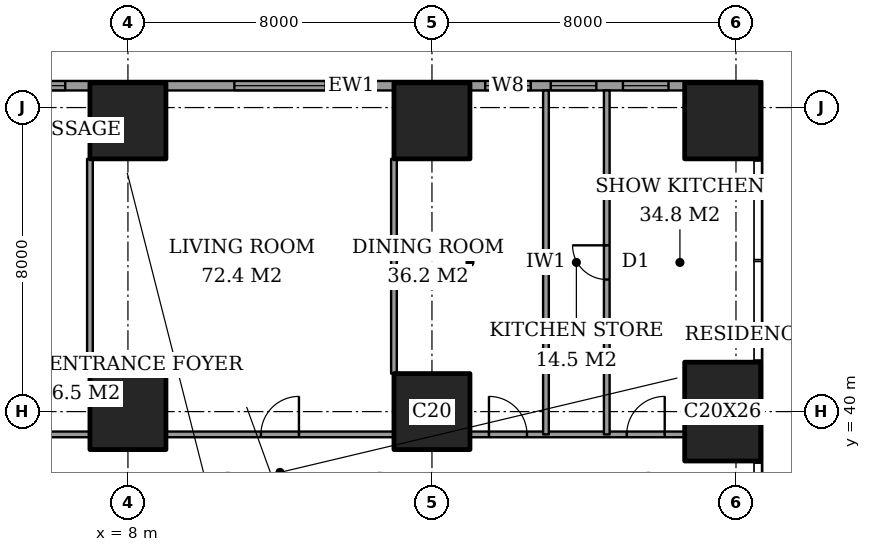
"""IFC4 building model, lengths in metres.
Left out: names, types, materials, properties, quantities, classifications, styles, units other than length and angle.
Written with IfcOpenShell. Run it as: python <this file> out.ifc"""

import sys

from ifc_helpers import new_model, si_unit, direction, frame, frame_2d, origin, origin_2d, place, context, subcontext, project, spatial, rectangle, extrude, element, fill, save


model = new_model("IFC4")
c1 = context("Model", 3, precision=1e-05, world=origin(), true_north=direction((0.0, 1.0)))
c2 = subcontext(c1, "Body", "Model", "MODEL_VIEW")
j1 = project(units=[si_unit("LENGTHUNIT", "METRE"), si_unit("PLANEANGLEUNIT", "RADIAN")], contexts=[c1])
p1 = place(None, origin())
s1 = spatial("IfcSite", under=j1, at=p1, CompositionType="ELEMENT")
p2 = place(p1, origin())
s2 = spatial("IfcBuilding", under=s1, at=p2, CompositionType="ELEMENT")
p3 = place(p2, frame((0.0, 0.0, 83.6)))
s3 = spatial("IfcBuildingStorey", under=s2, at=p3, CompositionType="ELEMENT", Elevation=83.6)
for number, where, z_axis, x_axis in (
    (1, (8.0, 40.0, 0.0), (0.0, 0.0, 1.0), (1.0, 0.0, 0.0)),
    (2, (8.0, 47.65, 0.0), (0.0, 0.0, 1.0), (1.0, 0.0, 0.0)),
    (3, (16.0, 40.0, 0.0), (0.0, 0.0, 1.0), (1.0, 0.0, 0.0)),
    (4, (16.0, 47.65, 0.0), (0.0, 0.0, 1.0), (1.0, 0.0, 0.0)),
):
    element("IfcColumn", number, at=place(p3, frame(where, z_axis=z_axis, x_axis=x_axis)), inside=s3, PredefinedType="COLUMN", context=c2, shape_type="SweptSolid", body=[
        extrude(rectangle(XDim=2.0, YDim=2.0, at=origin_2d()), origin(), (0.0, 0.0, 1.0), 3.6),
    ])
p4 = place(p3, frame((23.65, 40.0, 0.0), z_axis=(0.0, 0.0, 1.0), x_axis=(1.0, 0.0, 0.0)))
e5 = element("IfcColumn", 5, at=p4, inside=s3, PredefinedType="COLUMN", context=c2, shape_type="SweptSolid", body=[
    extrude(rectangle(XDim=2.0, YDim=2.6, at=origin_2d()), origin(), (0.0, 0.0, 1.0), 3.6),
])
p5 = place(p3, frame((23.65, 47.65, 0.0), z_axis=(0.0, 0.0, 1.0), x_axis=(1.0, 0.0, 0.0)))
e6 = element("IfcColumn", 6, at=p5, inside=s3, PredefinedType="COLUMN", context=c2, shape_type="SweptSolid", body=[
    extrude(rectangle(XDim=2.0, YDim=2.0, at=origin_2d()), origin(), (0.0, 0.0, 1.0), 3.6),
])
p6 = place(p3, frame((24.575, 48.575, 0.0), z_axis=(0.0, 0.0, 1.0), x_axis=(-1.0, 0.0, 0.0)))
e7 = element("IfcWall", 7, at=p6, inside=s3, PredefinedType="SOLIDWALL", context=c2, shape_type="SweptSolid", body=[
    extrude(rectangle(XDim=21.4, YDim=0.25, at=frame_2d((10.7, 0.0))), origin(), (0.0, 0.0, 1.0), 3.6),
])
p7 = place(p6, frame((2.35, 0.0, 0.6)))
e8 = element("IfcOpeningElement", 8, at=p7, cuts=e7, PredefinedType="OPENING", context=c2, shape_type="SweptSolid", body=[
    extrude(rectangle(XDim=1.2, YDim=2.0, at=frame_2d((0.6, 1.0))), frame((0.0, 0.135, 0.0), z_axis=(0.0, -1.0, 0.0), x_axis=(1.0, 0.0, 0.0)), (0.0, 0.0, 1.0), 0.27),
])
p8 = place(p6, frame((4.25, 0.0, 0.6)))
e9 = element("IfcOpeningElement", 9, at=p8, cuts=e7, PredefinedType="OPENING", context=c2, shape_type="SweptSolid", body=[
    extrude(rectangle(XDim=1.2, YDim=2.0, at=frame_2d((0.6, 1.0))), frame((0.0, 0.135, 0.0), z_axis=(0.0, -1.0, 0.0), x_axis=(1.0, 0.0, 0.0)), (0.0, 0.0, 1.0), 0.27),
])
p9 = place(p6, frame((5.975, 0.0, 0.6)))
e10 = element("IfcOpeningElement", 10, at=p9, cuts=e7, PredefinedType="OPENING", context=c2, shape_type="SweptSolid", body=[
    extrude(rectangle(XDim=1.2, YDim=2.0, at=frame_2d((0.6, 1.0))), frame((0.0, 0.135, 0.0), z_axis=(0.0, -1.0, 0.0), x_axis=(1.0, 0.0, 0.0)), (0.0, 0.0, 1.0), 0.27),
])
p10 = place(p6, frame((11.375, 0.0, 0.6)))
e11 = element("IfcOpeningElement", 11, at=p10, cuts=e7, PredefinedType="OPENING", context=c2, shape_type="SweptSolid", body=[
    extrude(rectangle(XDim=2.4, YDim=2.0, at=frame_2d((1.2, 1.0))), frame((0.0, 0.135, 0.0), z_axis=(0.0, -1.0, 0.0), x_axis=(1.0, 0.0, 0.0)), (0.0, 0.0, 1.0), 0.27),
])
p11 = place(p6, frame((18.225, 0.0, 0.6)))
e12 = element("IfcOpeningElement", 12, at=p11, cuts=e7, PredefinedType="OPENING", context=c2, shape_type="SweptSolid", body=[
    extrude(rectangle(XDim=2.4, YDim=2.0, at=frame_2d((1.2, 1.0))), frame((0.0, 0.135, 0.0), z_axis=(0.0, -1.0, 0.0), x_axis=(1.0, 0.0, 0.0)), (0.0, 0.0, 1.0), 0.27),
])
p12 = place(p3, frame((1.35, 39.4, 0.0), z_axis=(0.0, 0.0, 1.0), x_axis=(1.0, 0.0, 0.0)))
e13 = element("IfcWall", 13, at=p12, inside=s3, PredefinedType="PARTITIONING", context=c2, shape_type="SweptSolid", body=[
    extrude(rectangle(XDim=5.65, YDim=0.15, at=frame_2d((2.825, 0.0))), origin(), (0.0, 0.0, 1.0), 3.35),
])
p13 = place(p12, frame((2.325, 0.0, 0.0)))
e14 = element("IfcOpeningElement", 14, at=p13, cuts=e13, PredefinedType="OPENING", context=c2, shape_type="SweptSolid", body=[
    extrude(rectangle(XDim=1.0, YDim=2.1, at=frame_2d((0.5, 1.05))), frame((0.0, 0.085, 0.0), z_axis=(0.0, -1.0, 0.0), x_axis=(1.0, 0.0, 0.0)), (0.0, 0.0, 1.0), 0.17),
])
p14 = place(p3, frame((9.0, 39.4, 0.0), z_axis=(0.0, 0.0, 1.0), x_axis=(1.0, 0.0, 0.0)))
e15 = element("IfcWall", 15, at=p14, inside=s3, PredefinedType="PARTITIONING", context=c2, shape_type="SweptSolid", body=[
    extrude(rectangle(XDim=6.0, YDim=0.15, at=frame_2d((3.0, 0.0))), origin(), (0.0, 0.0, 1.0), 3.35),
])
p15 = place(p14, frame((2.5, 0.0, 0.0)))
e16 = element("IfcOpeningElement", 16, at=p15, cuts=e15, PredefinedType="OPENING", context=c2, shape_type="SweptSolid", body=[
    extrude(rectangle(XDim=1.0, YDim=2.1, at=frame_2d((0.5, 1.05))), frame((0.0, 0.085, 0.0), z_axis=(0.0, -1.0, 0.0), x_axis=(1.0, 0.0, 0.0)), (0.0, 0.0, 1.0), 0.17),
])
p16 = place(p3, frame((17.0, 39.4, 0.0), z_axis=(0.0, 0.0, 1.0), x_axis=(1.0, 0.0, 0.0)))
e17 = element("IfcWall", 17, at=p16, inside=s3, PredefinedType="PARTITIONING", context=c2, shape_type="SweptSolid", body=[
    extrude(rectangle(XDim=5.65, YDim=0.15, at=frame_2d((2.825, 0.0))), origin(), (0.0, 0.0, 1.0), 3.35),
])
p17 = place(p16, frame((0.5, 0.0, 0.0)))
e18 = element("IfcOpeningElement", 18, at=p17, cuts=e17, PredefinedType="OPENING", context=c2, shape_type="SweptSolid", body=[
    extrude(rectangle(XDim=1.0, YDim=2.1, at=frame_2d((0.5, 1.05))), frame((0.0, 0.085, 0.0), z_axis=(0.0, -1.0, 0.0), x_axis=(1.0, 0.0, 0.0)), (0.0, 0.0, 1.0), 0.17),
])
p18 = place(p16, frame((4.125, 0.0, 0.0)))
e19 = element("IfcOpeningElement", 19, at=p18, cuts=e17, PredefinedType="OPENING", context=c2, shape_type="SweptSolid", body=[
    extrude(rectangle(XDim=1.0, YDim=2.1, at=frame_2d((0.5, 1.05))), frame((0.0, 0.085, 0.0), z_axis=(0.0, -1.0, 0.0), x_axis=(1.0, 0.0, 0.0)), (0.0, 0.0, 1.0), 0.17),
])
for number, where, z_axis, x_axis in (
    (20, (7.0, 41.0, 0.0), (0.0, 0.0, 1.0), (0.0, 1.0, 0.0)),
    (21, (15.0, 41.0, 0.0), (0.0, 0.0, 1.0), (0.0, 1.0, 0.0)),
):
    element("IfcWall", number, at=place(p3, frame(where, z_axis=z_axis, x_axis=x_axis)), inside=s3, PredefinedType="PARTITIONING", context=c2, shape_type="SweptSolid", body=[
        extrude(rectangle(XDim=5.65, YDim=0.15, at=frame_2d((2.825, 0.0))), origin(), (0.0, 0.0, 1.0), 3.35),
    ])
p19 = place(p3, frame((19.0, 39.4, 0.0), z_axis=(0.0, 0.0, 1.0), x_axis=(0.0, 1.0, 0.0)))
e22 = element("IfcWall", 22, at=p19, inside=s3, PredefinedType="PARTITIONING", context=c2, shape_type="SweptSolid", body=[
    extrude(rectangle(XDim=9.05, YDim=0.15, at=frame_2d((4.525, 0.0))), origin(), (0.0, 0.0, 1.0), 3.35),
])
p20 = place(p3, frame((20.6, 39.4, 0.0), z_axis=(0.0, 0.0, 1.0), x_axis=(0.0, 1.0, 0.0)))
e23 = element("IfcWall", 23, at=p20, inside=s3, PredefinedType="PARTITIONING", context=c2, shape_type="SweptSolid", body=[
    extrude(rectangle(XDim=9.05, YDim=0.15, at=frame_2d((4.525, 0.0))), origin(), (0.0, 0.0, 1.0), 3.35),
])
p21 = place(p20, frame((4.075, 0.0, 0.0)))
e24 = element("IfcOpeningElement", 24, at=p21, cuts=e23, PredefinedType="OPENING", context=c2, shape_type="SweptSolid", body=[
    extrude(rectangle(XDim=0.9, YDim=2.1, at=frame_2d((0.45, 1.05))), frame((0.0, 0.085, 0.0), z_axis=(0.0, -1.0, 0.0), x_axis=(1.0, 0.0, 0.0)), (0.0, 0.0, 1.0), 0.17),
])
p22 = place(p7, origin())
e25 = element("IfcWindow", 25, at=p22, inside=s3, PartitioningType="SINGLE_PANEL", PredefinedType="WINDOW", context=c2, shape_type="SweptSolid", body=[
    extrude(rectangle(XDim=1.2, YDim=2.0, at=frame_2d((0.6, 1.0))), frame((0.0, 0.03, 0.0), z_axis=(0.0, -1.0, 0.0), x_axis=(1.0, 0.0, 0.0)), (0.0, 0.0, 1.0), 0.06),
])
fill(e8, e25)
p23 = place(p8, origin())
e26 = element("IfcWindow", 26, at=p23, inside=s3, PartitioningType="SINGLE_PANEL", PredefinedType="WINDOW", context=c2, shape_type="SweptSolid", body=[
    extrude(rectangle(XDim=1.2, YDim=2.0, at=frame_2d((0.6, 1.0))), frame((0.0, 0.03, 0.0), z_axis=(0.0, -1.0, 0.0), x_axis=(1.0, 0.0, 0.0)), (0.0, 0.0, 1.0), 0.06),
])
fill(e9, e26)
p24 = place(p9, origin())
e27 = element("IfcWindow", 27, at=p24, inside=s3, PartitioningType="SINGLE_PANEL", PredefinedType="WINDOW", context=c2, shape_type="SweptSolid", body=[
    extrude(rectangle(XDim=1.2, YDim=2.0, at=frame_2d((0.6, 1.0))), frame((0.0, 0.03, 0.0), z_axis=(0.0, -1.0, 0.0), x_axis=(1.0, 0.0, 0.0)), (0.0, 0.0, 1.0), 0.06),
])
fill(e10, e27)
p25 = place(p10, origin())
e28 = element("IfcWindow", 28, at=p25, inside=s3, PartitioningType="SINGLE_PANEL", PredefinedType="WINDOW", context=c2, shape_type="SweptSolid", body=[
    extrude(rectangle(XDim=2.4, YDim=2.0, at=frame_2d((1.2, 1.0))), frame((0.0, 0.03, 0.0), z_axis=(0.0, -1.0, 0.0), x_axis=(1.0, 0.0, 0.0)), (0.0, 0.0, 1.0), 0.06),
])
fill(e11, e28)
p26 = place(p11, origin())
e29 = element("IfcWindow", 29, at=p26, inside=s3, PartitioningType="SINGLE_PANEL", PredefinedType="WINDOW", context=c2, shape_type="SweptSolid", body=[
    extrude(rectangle(XDim=2.4, YDim=2.0, at=frame_2d((1.2, 1.0))), frame((0.0, 0.03, 0.0), z_axis=(0.0, -1.0, 0.0), x_axis=(1.0, 0.0, 0.0)), (0.0, 0.0, 1.0), 0.06),
])
fill(e12, e29)
p27 = place(p15, origin())
e30 = element("IfcDoor", 30, at=p27, inside=s3, OperationType="SINGLE_SWING_LEFT", PredefinedType="DOOR", context=c2, shape_type="SweptSolid", body=[
    extrude(rectangle(XDim=1.0, YDim=2.1, at=frame_2d((0.5, 1.05))), frame((0.0, 0.025, 0.0), z_axis=(0.0, -1.0, 0.0), x_axis=(1.0, 0.0, 0.0)), (0.0, 0.0, 1.0), 0.05),
])
fill(e16, e30)
p28 = place(p17, origin())
e31 = element("IfcDoor", 31, at=p28, inside=s3, OperationType="SINGLE_SWING_RIGHT", PredefinedType="DOOR", context=c2, shape_type="SweptSolid", body=[
    extrude(rectangle(XDim=1.0, YDim=2.1, at=frame_2d((0.5, 1.05))), frame((0.0, 0.025, 0.0), z_axis=(0.0, -1.0, 0.0), x_axis=(1.0, 0.0, 0.0)), (0.0, 0.0, 1.0), 0.05),
])
fill(e18, e31)
p29 = place(p21, origin())
e32 = element("IfcDoor", 32, at=p29, inside=s3, OperationType="SINGLE_SWING_LEFT", PredefinedType="DOOR", context=c2, shape_type="SweptSolid", body=[
    extrude(rectangle(XDim=0.9, YDim=2.1, at=frame_2d((0.45, 1.05))), frame((0.0, 0.025, 0.0), z_axis=(0.0, -1.0, 0.0), x_axis=(1.0, 0.0, 0.0)), (0.0, 0.0, 1.0), 0.05),
])
fill(e24, e32)
p30 = place(p18, origin())
e33 = element("IfcDoor", 33, at=p30, inside=s3, OperationType="SINGLE_SWING_LEFT", PredefinedType="DOOR", context=c2, shape_type="SweptSolid", body=[
    extrude(rectangle(XDim=1.0, YDim=2.1, at=frame_2d((0.5, 1.05))), frame((0.0, 0.025, 0.0), z_axis=(0.0, -1.0, 0.0), x_axis=(1.0, 0.0, 0.0)), (0.0, 0.0, 1.0), 0.05),
])
fill(e19, e33)
save(model, sys.argv[1])
